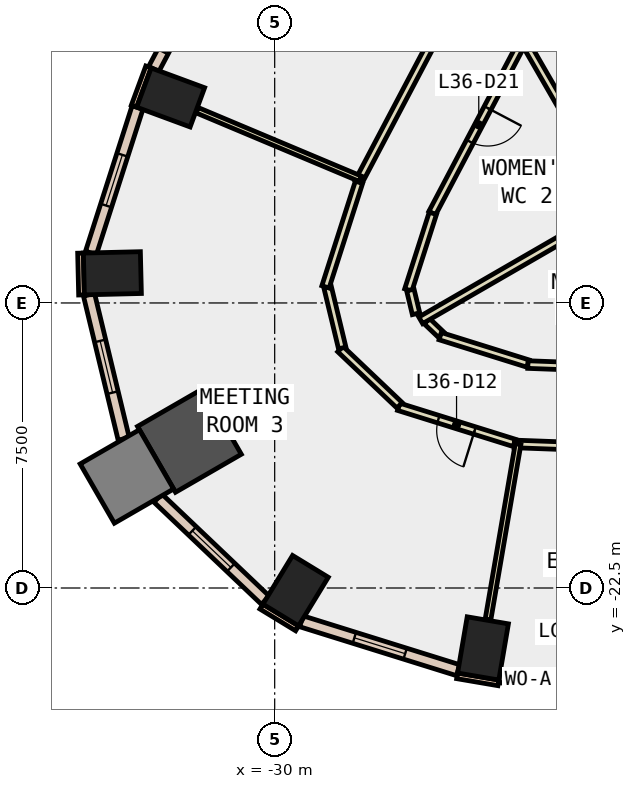
"""IFC4 building model, lengths in metres.
Left out: names, types, materials, properties, quantities, classifications, styles, units other than length and angle.
Written with IfcOpenShell. Run it as: python <this file> out.ifc"""

import sys

from ifc_helpers import new_model, si_unit, direction, frame, frame_2d, origin, origin_2d, place, context, subcontext, project, spatial, rectangle, extrude, element, fill, save


model = new_model("IFC4")
c1 = context("Model", 3, precision=1e-05, world=origin(), true_north=direction((0.0, 1.0)))
c2 = subcontext(c1, "Body", "Model", "MODEL_VIEW")
j1 = project(units=[si_unit("LENGTHUNIT", "METRE"), si_unit("PLANEANGLEUNIT", "RADIAN")], contexts=[c1])
p1 = place(None, origin())
s1 = spatial("IfcSite", under=j1, at=p1, CompositionType="ELEMENT")
p2 = place(p1, origin())
s2 = spatial("IfcBuilding", under=s1, at=p2, CompositionType="ELEMENT")
p3 = place(p2, frame((0.0, 0.0, 163.4)))
s3 = spatial("IfcBuildingStorey", under=s2, at=p3, CompositionType="ELEMENT", Elevation=163.4)
for number, where, z_axis, x_axis in (
    (1, (-24.518, -24.09, -0.4), (0.0, 0.0, 1.0), (-0.986, 0.168, 0.0)),
    (2, (-32.738, -9.593, -0.4), (0.0, 0.0, 1.0), (0.347, 0.938, 0.0)),
    (3, (-34.271, -14.219, -0.4), (0.0, 0.0, 1.0), (-0.024, 1.0, 0.0)),
):
    element("IfcColumn", number, at=place(p3, frame(where, z_axis=z_axis, x_axis=x_axis)), inside=s3, PredefinedType="COLUMN", context=c2, shape_type="SweptSolid", body=[
        extrude(rectangle(XDim=1.1, YDim=1.5, at=origin_2d()), origin(), (0.0, 0.0, 1.0), 4.2),
    ])
p4 = place(p3, frame((-32.244, -18.615, -0.4), z_axis=(0.0, 0.0, 1.0), x_axis=(0.866025403784, 0.5, 0.0)))
e4 = element("IfcColumn", 4, at=p4, inside=s3, PredefinedType="COLUMN", context=c2, shape_type="SweptSolid", body=[
    extrude(rectangle(XDim=2.0, YDim=2.0, at=origin_2d()), origin(), (0.0, 0.0, 1.0), 4.2),
])
p5 = place(p3, frame((-29.45, -22.571, -0.4), z_axis=(0.0, 0.0, 1.0), x_axis=(-0.853714435155, 0.520741455243, 0.0)))
e5 = element("IfcColumn", 5, at=p5, inside=s3, PredefinedType="COLUMN", context=c2, shape_type="SweptSolid", body=[
    extrude(rectangle(XDim=1.1, YDim=1.5, at=origin_2d()), origin(), (0.0, 0.0, 1.0), 4.2),
])
p6 = place(p3, frame((-33.889, -19.565, -0.4), z_axis=(0.0, 0.0, 1.0), x_axis=(0.866025403784, 0.5, 0.0)))
e6 = element("IfcColumn", 6, at=p6, inside=s3, PredefinedType="COLUMN", context=c2, shape_type="SweptSolid", body=[
    extrude(rectangle(XDim=1.8, YDim=1.8, at=origin_2d()), origin(), (0.0, 0.0, 1.0), 4.2),
])
p7 = place(p3, frame((-33.321, -8.791, 0.0), z_axis=(0.0, 0.0, 1.0), x_axis=(-0.346229846278, -0.938149718087, 0.0)))
e7 = element("IfcWall", 7, at=p7, inside=s3, PredefinedType="STANDARD", context=c2, shape_type="SweptSolid", body=[
    extrude(rectangle(XDim=1.1, YDim=0.15, at=frame_2d((0.55, 0.0))), origin(), (0.0, 0.0, 1.0), 3.8),
])
p8 = place(p3, frame((-25.199, -24.811, 0.0), z_axis=(0.0, 0.0, 1.0), x_axis=(0.985763338892, -0.168138751323, 0.0)))
e8 = element("IfcWall", 8, at=p8, inside=s3, PredefinedType="STANDARD", context=c2, shape_type="SweptSolid", body=[
    extrude(rectangle(XDim=1.101, YDim=0.15, at=frame_2d((0.55, 0.0))), origin(), (0.0, 0.0, 1.0), 3.8),
])
p9 = place(p3, frame((-35.109, -13.689, 0.0), z_axis=(0.0, 0.0, 1.0), x_axis=(0.023517683673, -0.999723421029, 0.0)))
e9 = element("IfcWall", 9, at=p9, inside=s3, PredefinedType="STANDARD", context=c2, shape_type="SweptSolid", body=[
    extrude(rectangle(XDim=1.1, YDim=0.15, at=frame_2d((0.55, 0.0))), origin(), (0.0, 0.0, 1.0), 3.8),
])
p10 = place(p3, frame((-30.349, -22.989, 0.0), z_axis=(0.0, 0.0, 1.0), x_axis=(0.854065628997, -0.520165263514, 0.0)))
e10 = element("IfcWall", 10, at=p10, inside=s3, PredefinedType="STANDARD", context=c2, shape_type="SweptSolid", body=[
    extrude(rectangle(XDim=1.1, YDim=0.15, at=frame_2d((0.55, 0.0))), origin(), (0.0, 0.0, 1.0), 3.8),
])
p11 = place(p3, frame((-24.09, -24.848, 0.0), z_axis=(0.0, 0.0, 1.0), x_axis=(0.999307730926, -0.037202942236, 0.0)))
e11 = element("IfcWall", 11, at=p11, inside=s3, PredefinedType="STANDARD", context=c2, shape_type="SweptSolid", body=[
    extrude(rectangle(XDim=7.317, YDim=0.3, at=frame_2d((3.659, 0.0))), origin(), (0.0, 0.0, 1.0), 3.8),
])
p12 = place(p11, frame((0.629, 0.0, 0.9)))
e12 = element("IfcOpeningElement", 12, at=p12, cuts=e11, PredefinedType="OPENING", context=c2, shape_type="SweptSolid", body=[
    extrude(rectangle(XDim=2.4, YDim=2.6, at=frame_2d((1.2, 1.3))), frame((0.0, 0.16, 0.0), z_axis=(0.0, -1.0, 0.0), x_axis=(1.0, 0.0, 0.0)), (0.0, 0.0, 1.0), 0.32),
])
p13 = place(p11, frame((4.288, 0.0, 0.9)))
e13 = element("IfcOpeningElement", 13, at=p13, cuts=e11, PredefinedType="OPENING", context=c2, shape_type="SweptSolid", body=[
    extrude(rectangle(XDim=2.4, YDim=2.6, at=frame_2d((1.2, 1.3))), frame((0.0, 0.16, 0.0), z_axis=(0.0, -1.0, 0.0), x_axis=(1.0, 0.0, 0.0)), (0.0, 0.0, 1.0), 0.32),
])
p14 = place(p3, frame((-30.358, -3.488, 0.0), z_axis=(0.0, 0.0, 1.0), x_axis=(-0.466399410196, -0.884574242316, 0.0)))
e14 = element("IfcWall", 14, at=p14, inside=s3, PredefinedType="STANDARD", context=c2, shape_type="SweptSolid", body=[
    extrude(rectangle(XDim=6.055, YDim=0.3, at=frame_2d((3.027, 0.0))), origin(), (0.0, 0.0, 1.0), 3.8),
])
p15 = place(p14, frame((0.514, 0.0, 0.9)))
e15 = element("IfcOpeningElement", 15, at=p15, cuts=e14, PredefinedType="OPENING", context=c2, shape_type="SweptSolid", body=[
    extrude(rectangle(XDim=2.0, YDim=2.6, at=frame_2d((1.0, 1.3))), frame((0.0, 0.16, 0.0), z_axis=(0.0, -1.0, 0.0), x_axis=(1.0, 0.0, 0.0)), (0.0, 0.0, 1.0), 0.32),
])
p16 = place(p14, frame((3.541, 0.0, 0.9)))
e16 = element("IfcOpeningElement", 16, at=p16, cuts=e14, PredefinedType="OPENING", context=c2, shape_type="SweptSolid", body=[
    extrude(rectangle(XDim=2.0, YDim=2.6, at=frame_2d((1.0, 1.3))), frame((0.0, 0.16, 0.0), z_axis=(0.0, -1.0, 0.0), x_axis=(1.0, 0.0, 0.0)), (0.0, 0.0, 1.0), 0.32),
])
p17 = place(p3, frame((-33.609, -9.856, 0.0), z_axis=(0.0, 0.0, 1.0), x_axis=(-0.305018133869, -0.952346543025, 0.0)))
e17 = element("IfcWall", 17, at=p17, inside=s3, PredefinedType="STANDARD", context=c2, shape_type="SweptSolid", body=[
    extrude(rectangle(XDim=4.02, YDim=0.3, at=frame_2d((2.01, 0.0))), origin(), (0.0, 0.0, 1.0), 3.8),
])
p18 = place(p17, frame((1.31, 0.0, 0.9)))
e18 = element("IfcOpeningElement", 18, at=p18, cuts=e17, PredefinedType="OPENING", context=c2, shape_type="SweptSolid", body=[
    extrude(rectangle(XDim=1.4, YDim=2.6, at=frame_2d((0.7, 1.3))), frame((0.0, 0.16, 0.0), z_axis=(0.0, -1.0, 0.0), x_axis=(1.0, 0.0, 0.0)), (0.0, 0.0, 1.0), 0.32),
])
p19 = place(p3, frame((-34.886, -14.783, 0.0), z_axis=(0.0, 0.0, 1.0), x_axis=(0.234102046927, -0.972212030179, 0.0)))
e19 = element("IfcWall", 19, at=p19, inside=s3, PredefinedType="STANDARD", context=c2, shape_type="SweptSolid", body=[
    extrude(rectangle(XDim=3.9, YDim=0.3, at=frame_2d((1.95, 0.0))), origin(), (0.0, 0.0, 1.0), 3.8),
])
p20 = place(p19, frame((1.25, 0.0, 0.9)))
e20 = element("IfcOpeningElement", 20, at=p20, cuts=e19, PredefinedType="OPENING", context=c2, shape_type="SweptSolid", body=[
    extrude(rectangle(XDim=1.4, YDim=2.6, at=frame_2d((0.7, 1.3))), frame((0.0, 0.16, 0.0), z_axis=(0.0, -1.0, 0.0), x_axis=(1.0, 0.0, 0.0)), (0.0, 0.0, 1.0), 0.32),
])
p21 = place(p3, frame((-33.074, -20.133, 0.0), z_axis=(0.0, 0.0, 1.0), x_axis=(0.724807239831, -0.688951714628, 0.0)))
e21 = element("IfcWall", 21, at=p21, inside=s3, PredefinedType="STANDARD", context=c2, shape_type="SweptSolid", body=[
    extrude(rectangle(XDim=3.902, YDim=0.3, at=frame_2d((1.951, 0.0))), origin(), (0.0, 0.0, 1.0), 3.8),
])
p22 = place(p21, frame((1.251, 0.0, 0.9)))
e22 = element("IfcOpeningElement", 22, at=p22, cuts=e21, PredefinedType="OPENING", context=c2, shape_type="SweptSolid", body=[
    extrude(rectangle(XDim=1.4, YDim=2.6, at=frame_2d((0.7, 1.3))), frame((0.0, 0.16, 0.0), z_axis=(0.0, -1.0, 0.0), x_axis=(1.0, 0.0, 0.0)), (0.0, 0.0, 1.0), 0.32),
])
p23 = place(p3, frame((-29.298, -23.376, 0.0), z_axis=(0.0, 0.0, 1.0), x_axis=(0.954628614874, -0.29779893832, 0.0)))
e23 = element("IfcWall", 23, at=p23, inside=s3, PredefinedType="STANDARD", context=c2, shape_type="SweptSolid", body=[
    extrude(rectangle(XDim=4.322, YDim=0.3, at=frame_2d((2.161, 0.0))), origin(), (0.0, 0.0, 1.0), 3.8),
])
p24 = place(p23, frame((1.461, 0.0, 0.9)))
e24 = element("IfcOpeningElement", 24, at=p24, cuts=e23, PredefinedType="OPENING", context=c2, shape_type="SweptSolid", body=[
    extrude(rectangle(XDim=1.4, YDim=2.6, at=frame_2d((0.7, 1.3))), frame((0.0, 0.16, 0.0), z_axis=(0.0, -1.0, 0.0), x_axis=(1.0, 0.0, 0.0)), (0.0, 0.0, 1.0), 0.32),
])
p25 = place(p3, frame((-23.406, -7.991, 0.0), z_axis=(0.0, 0.0, 1.0), x_axis=(-0.466307932558, -0.884622468646, 0.0)))
e25 = element("IfcWall", 25, at=p25, inside=s3, PredefinedType="PARTITIONING", context=c2, shape_type="SweptSolid", body=[
    extrude(rectangle(XDim=5.25, YDim=0.2, at=frame_2d((2.625, 0.0))), origin(), (0.0, 0.0, 1.0), 3.8),
])
p26 = place(p25, frame((2.125, 0.0, 0.0)))
e26 = element("IfcOpeningElement", 26, at=p26, cuts=e25, PredefinedType="OPENING", context=c2, shape_type="SweptSolid", body=[
    extrude(rectangle(XDim=1.0, YDim=2.1, at=frame_2d((0.5, 1.05))), frame((0.0, 0.11, 0.0), z_axis=(0.0, -1.0, 0.0), x_axis=(1.0, 0.0, 0.0)), (0.0, 0.0, 1.0), 0.22),
])
p27 = place(p3, frame((-25.838, -12.642, 0.0), z_axis=(0.0, 0.0, 1.0), x_axis=(-0.305169069368, -0.952298188122, 0.0)))
e27 = element("IfcWall", 27, at=p27, inside=s3, PredefinedType="PARTITIONING", context=c2, shape_type="SweptSolid", body=[
    extrude(rectangle(XDim=2.117, YDim=0.2, at=frame_2d((1.059, 0.0))), origin(), (0.0, 0.0, 1.0), 3.8),
])
p28 = place(p3, frame((-26.43, -14.66, 0.0), z_axis=(0.0, 0.0, 1.0), x_axis=(0.233574377125, -0.972338938, 0.0)))
e28 = element("IfcWall", 28, at=p28, inside=s3, PredefinedType="PARTITIONING", context=c2, shape_type="SweptSolid", body=[
    extrude(rectangle(XDim=0.642, YDim=0.2, at=frame_2d((0.321, 0.0))), origin(), (0.0, 0.0, 1.0), 3.8),
])
p29 = place(p3, frame((-25.998, -15.476, 0.0), z_axis=(0.0, 0.0, 1.0), x_axis=(0.724294499657, -0.689490737985, 0.0)))
e29 = element("IfcWall", 29, at=p29, inside=s3, PredefinedType="PARTITIONING", context=c2, shape_type="SweptSolid", body=[
    extrude(rectangle(XDim=0.519, YDim=0.2, at=frame_2d((0.26, 0.0))), origin(), (0.0, 0.0, 1.0), 3.8),
])
p30 = place(p3, frame((-25.645, -15.873, 0.0), z_axis=(0.0, 0.0, 1.0), x_axis=(0.95454810771, -0.298056890655, 0.0)))
e30 = element("IfcWall", 30, at=p30, inside=s3, PredefinedType="PARTITIONING", context=c2, shape_type="SweptSolid", body=[
    extrude(rectangle(XDim=2.422, YDim=0.2, at=frame_2d((1.211, 0.0))), origin(), (0.0, 0.0, 1.0), 3.8),
])
p31 = place(p3, frame((-23.337, -16.621, 0.0), z_axis=(0.0, 0.0, 1.0), x_axis=(0.999311710526, -0.037095892019, 0.0)))
e31 = element("IfcWall", 31, at=p31, inside=s3, PredefinedType="PARTITIONING", context=c2, shape_type="SweptSolid", body=[
    extrude(rectangle(XDim=4.824, YDim=0.2, at=frame_2d((2.412, 0.0))), origin(), (0.0, 0.0, 1.0), 3.8),
])
p32 = place(p31, frame((1.913, 0.0, 0.0)))
e32 = element("IfcOpeningElement", 32, at=p32, cuts=e31, PredefinedType="OPENING", context=c2, shape_type="SweptSolid", body=[
    extrude(rectangle(XDim=1.0, YDim=2.1, at=frame_2d((0.5, 1.05))), frame((0.0, 0.11, 0.0), z_axis=(0.0, -1.0, 0.0), x_axis=(1.0, 0.0, 0.0)), (0.0, 0.0, 1.0), 0.22),
])
p33 = place(p3, frame((-27.798, -11.819, 0.0), z_axis=(0.0, 0.0, 1.0), x_axis=(0.466450727507, 0.884547182918, 0.0)))
e33 = element("IfcWall", 33, at=p33, inside=s3, PredefinedType="PARTITIONING", context=c2, shape_type="SweptSolid", body=[
    extrude(rectangle(XDim=6.685, YDim=0.2, at=frame_2d((3.342, 0.0))), origin(), (0.0, 0.0, 1.0), 3.8),
])
p34 = place(p3, frame((-23.691, -18.683, 0.0), z_axis=(0.0, 0.0, 1.0), x_axis=(-0.954546657381, 0.298061535398, 0.0)))
e34 = element("IfcWall", 34, at=p34, inside=s3, PredefinedType="PARTITIONING", context=c2, shape_type="SweptSolid", body=[
    extrude(rectangle(XDim=3.191, YDim=0.2, at=frame_2d((1.596, 0.0))), origin(), (0.0, 0.0, 1.0), 3.8),
])
p35 = place(p34, frame((1.096, 0.0, 0.0)))
e35 = element("IfcOpeningElement", 35, at=p35, cuts=e34, PredefinedType="OPENING", context=c2, shape_type="SweptSolid", body=[
    extrude(rectangle(XDim=1.0, YDim=2.1, at=frame_2d((0.5, 1.05))), frame((0.0, 0.11, 0.0), z_axis=(0.0, -1.0, 0.0), x_axis=(1.0, 0.0, 0.0)), (0.0, 0.0, 1.0), 0.22),
])
p36 = place(p3, frame((-26.714, -17.693, 0.0), z_axis=(0.0, 0.0, 1.0), x_axis=(-0.724712974479, 0.689050872303, 0.0)))
e36 = element("IfcWall", 36, at=p36, inside=s3, PredefinedType="PARTITIONING", context=c2, shape_type="SweptSolid", body=[
    extrude(rectangle(XDim=2.15, YDim=0.2, at=frame_2d((1.075, 0.0))), origin(), (0.0, 0.0, 1.0), 3.8),
])
p37 = place(p3, frame((-28.223, -16.184, 0.0), z_axis=(0.0, 0.0, 1.0), x_axis=(-0.233826017197, 0.972278454807, 0.0)))
e37 = element("IfcWall", 37, at=p37, inside=s3, PredefinedType="PARTITIONING", context=c2, shape_type="SweptSolid", body=[
    extrude(rectangle(XDim=1.651, YDim=0.2, at=frame_2d((0.825, 0.0))), origin(), (0.0, 0.0, 1.0), 3.8),
])
p38 = place(p3, frame((-28.663, -14.577, 0.0), z_axis=(0.0, 0.0, 1.0), x_axis=(0.304925942137, 0.952376065329, 0.0)))
e38 = element("IfcWall", 38, at=p38, inside=s3, PredefinedType="PARTITIONING", context=c2, shape_type="SweptSolid", body=[
    extrude(rectangle(XDim=2.89, YDim=0.2, at=frame_2d((1.445, 0.0))), origin(), (0.0, 0.0, 1.0), 3.8),
])
p39 = place(p3, frame((-15.974, -18.995, 0.0), z_axis=(0.0, 0.0, 1.0), x_axis=(-0.999314011084, 0.037033866276, 0.0)))
e39 = element("IfcWall", 39, at=p39, inside=s3, PredefinedType="PARTITIONING", context=c2, shape_type="SweptSolid", body=[
    extrude(rectangle(XDim=7.726, YDim=0.2, at=frame_2d((3.863, 0.0))), origin(), (0.0, 0.0, 1.0), 3.8),
])
p40 = place(p39, frame((3.363, 0.0, 0.0)))
e40 = element("IfcOpeningElement", 40, at=p40, cuts=e39, PredefinedType="OPENING", context=c2, shape_type="SweptSolid", body=[
    extrude(rectangle(XDim=1.0, YDim=2.1, at=frame_2d((0.5, 1.05))), frame((0.0, 0.11, 0.0), z_axis=(0.0, -1.0, 0.0), x_axis=(1.0, 0.0, 0.0)), (0.0, 0.0, 1.0), 0.22),
])
p41 = place(p3, frame((-20.986, -12.351, 0.0), z_axis=(0.0, 0.0, 1.0), x_axis=(-0.499993851206, 0.866028953763, 0.0)))
e41 = element("IfcWall", 41, at=p41, inside=s3, PredefinedType="PARTITIONING", context=c2, shape_type="SweptSolid", body=[
    extrude(rectangle(XDim=4.932, YDim=0.2, at=frame_2d((2.466, 0.0))), origin(), (0.0, 0.0, 1.0), 3.8),
])
p42 = place(p3, frame((-21.021, -12.491, 0.0), z_axis=(0.0, 0.0, 1.0), x_axis=(-0.865966890845, -0.500101333692, 0.0)))
e42 = element("IfcWall", 42, at=p42, inside=s3, PredefinedType="PARTITIONING", context=c2, shape_type="SweptSolid", body=[
    extrude(rectangle(XDim=5.931, YDim=0.2, at=frame_2d((2.965, 0.0))), origin(), (0.0, 0.0, 1.0), 3.8),
])
p43 = place(p3, frame((-27.751, -11.73, 0.0), z_axis=(0.0, 0.0, 1.0), x_axis=(-0.92196786851, 0.387266380462, 0.0)))
e43 = element("IfcWall", 43, at=p43, inside=s3, PredefinedType="PARTITIONING", context=c2, shape_type="SweptSolid", body=[
    extrude(rectangle(XDim=4.653, YDim=0.15, at=frame_2d((2.327, 0.0))), origin(), (0.0, 0.0, 1.0), 3.8),
])
p44 = place(p3, frame((-23.595, -18.712, 0.0), z_axis=(0.0, 0.0, 1.0), x_axis=(-0.168992733164, -0.985617296996, 0.0)))
e44 = element("IfcWall", 44, at=p44, inside=s3, PredefinedType="PARTITIONING", context=c2, shape_type="SweptSolid", body=[
    extrude(rectangle(XDim=4.687, YDim=0.15, at=frame_2d((2.343, 0.0))), origin(), (0.0, 0.0, 1.0), 3.8),
])
p45 = place(p12, origin())
e45 = element("IfcWindow", 45, at=p45, inside=s3, PartitioningType="SINGLE_PANEL", PredefinedType="WINDOW", context=c2, shape_type="SweptSolid", body=[
    extrude(rectangle(XDim=2.4, YDim=2.6, at=frame_2d((1.2, 1.3))), frame((0.0, 0.03, 0.0), z_axis=(0.0, -1.0, 0.0), x_axis=(1.0, 0.0, 0.0)), (0.0, 0.0, 1.0), 0.06),
])
fill(e12, e45)
p46 = place(p16, origin())
e46 = element("IfcWindow", 46, at=p46, inside=s3, PartitioningType="SINGLE_PANEL", PredefinedType="WINDOW", context=c2, shape_type="SweptSolid", body=[
    extrude(rectangle(XDim=2.0, YDim=2.6, at=frame_2d((1.0, 1.3))), frame((0.0, 0.03, 0.0), z_axis=(0.0, -1.0, 0.0), x_axis=(1.0, 0.0, 0.0)), (0.0, 0.0, 1.0), 0.06),
])
fill(e16, e46)
p47 = place(p18, origin())
e47 = element("IfcWindow", 47, at=p47, inside=s3, PartitioningType="SINGLE_PANEL", PredefinedType="WINDOW", context=c2, shape_type="SweptSolid", body=[
    extrude(rectangle(XDim=1.4, YDim=2.6, at=frame_2d((0.7, 1.3))), frame((0.0, 0.03, 0.0), z_axis=(0.0, -1.0, 0.0), x_axis=(1.0, 0.0, 0.0)), (0.0, 0.0, 1.0), 0.06),
])
fill(e18, e47)
p48 = place(p20, origin())
e48 = element("IfcWindow", 48, at=p48, inside=s3, PartitioningType="SINGLE_PANEL", PredefinedType="WINDOW", context=c2, shape_type="SweptSolid", body=[
    extrude(rectangle(XDim=1.4, YDim=2.6, at=frame_2d((0.7, 1.3))), frame((0.0, 0.03, 0.0), z_axis=(0.0, -1.0, 0.0), x_axis=(1.0, 0.0, 0.0)), (0.0, 0.0, 1.0), 0.06),
])
fill(e20, e48)
p49 = place(p22, origin())
e49 = element("IfcWindow", 49, at=p49, inside=s3, PartitioningType="SINGLE_PANEL", PredefinedType="WINDOW", context=c2, shape_type="SweptSolid", body=[
    extrude(rectangle(XDim=1.4, YDim=2.6, at=frame_2d((0.7, 1.3))), frame((0.0, 0.03, 0.0), z_axis=(0.0, -1.0, 0.0), x_axis=(1.0, 0.0, 0.0)), (0.0, 0.0, 1.0), 0.06),
])
fill(e22, e49)
p50 = place(p24, origin())
e50 = element("IfcWindow", 50, at=p50, inside=s3, PartitioningType="SINGLE_PANEL", PredefinedType="WINDOW", context=c2, shape_type="SweptSolid", body=[
    extrude(rectangle(XDim=1.4, YDim=2.6, at=frame_2d((0.7, 1.3))), frame((0.0, 0.03, 0.0), z_axis=(0.0, -1.0, 0.0), x_axis=(1.0, 0.0, 0.0)), (0.0, 0.0, 1.0), 0.06),
])
fill(e24, e50)
p51 = place(p35, origin())
e51 = element("IfcDoor", 51, at=p51, inside=s3, OperationType="SINGLE_SWING_LEFT", PredefinedType="DOOR", context=c2, shape_type="SweptSolid", body=[
    extrude(rectangle(XDim=1.0, YDim=2.1, at=frame_2d((0.5, 1.05))), frame((0.0, 0.025, 0.0), z_axis=(0.0, -1.0, 0.0), x_axis=(1.0, 0.0, 0.0)), (0.0, 0.0, 1.0), 0.05),
])
fill(e35, e51)
p52 = place(p26, origin())
e52 = element("IfcDoor", 52, at=p52, inside=s3, OperationType="SINGLE_SWING_LEFT", PredefinedType="DOOR", context=c2, shape_type="SweptSolid", body=[
    extrude(rectangle(XDim=1.0, YDim=2.1, at=frame_2d((0.5, 1.05))), frame((0.0, 0.025, 0.0), z_axis=(0.0, -1.0, 0.0), x_axis=(1.0, 0.0, 0.0)), (0.0, 0.0, 1.0), 0.05),
])
fill(e26, e52)
save(model, sys.argv[1])
